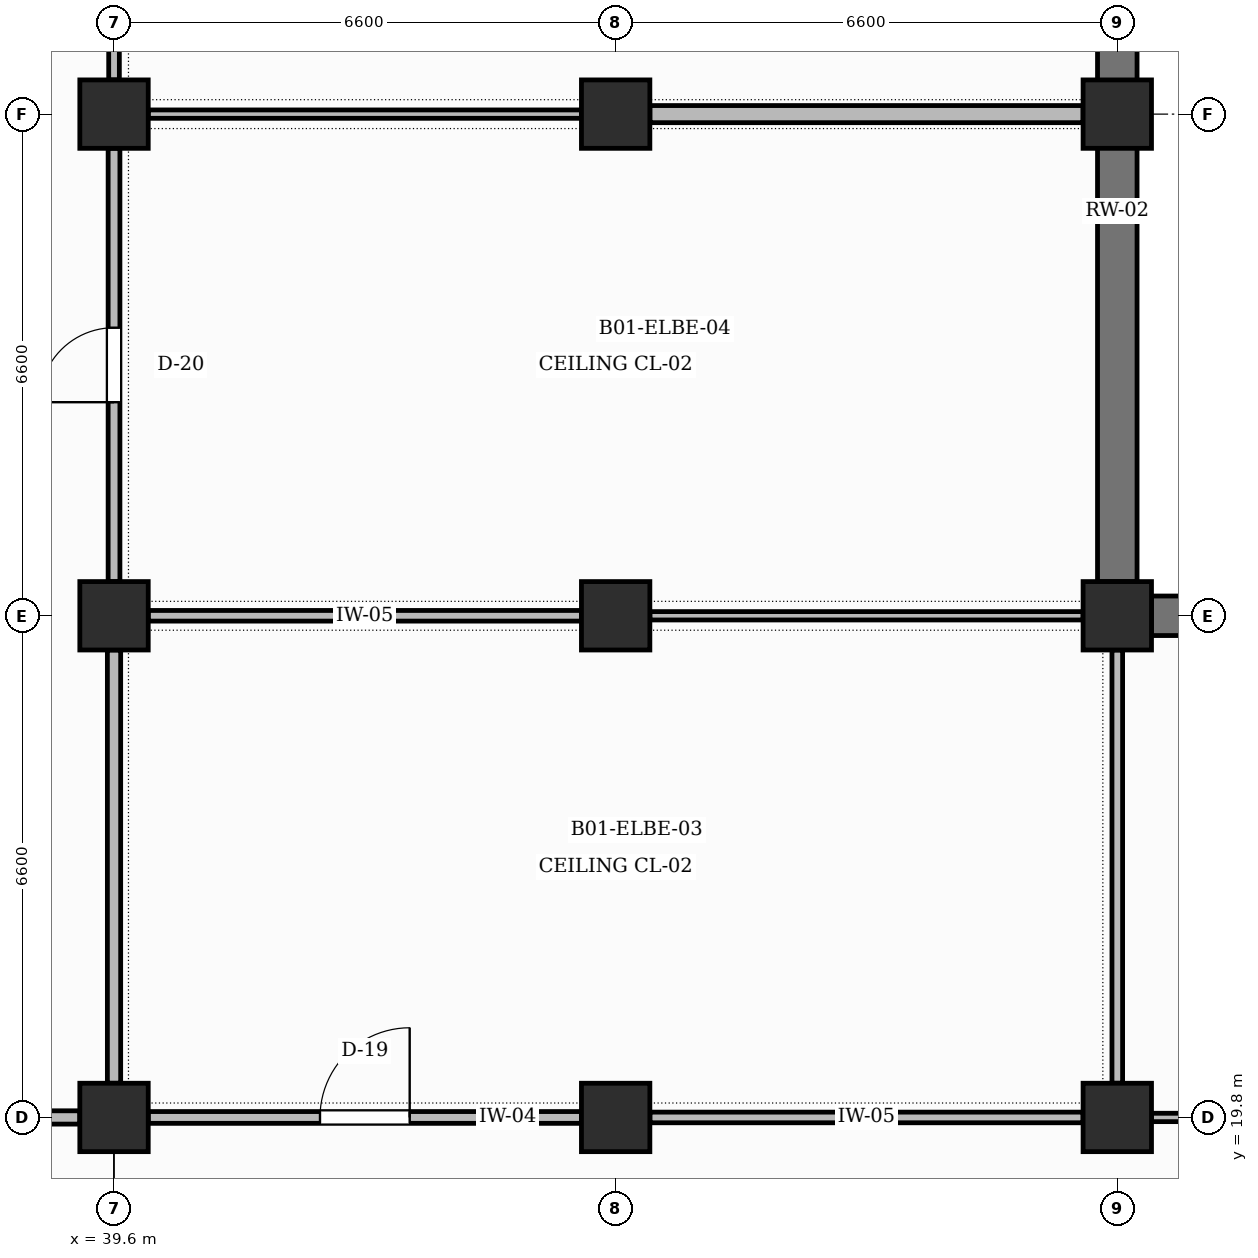
"""IFC4 building model, lengths in metres.
Left out: names, types, materials, properties, quantities, classifications, styles, units other than length and angle.
Written with IfcOpenShell. Run it as: python <this file> out.ifc"""

import sys

from ifc_helpers import new_model, si_unit, direction, frame, frame_2d, origin, origin_2d, place, context, subcontext, project, spatial, rectangle, extrude, element, fill, save


model = new_model("IFC4")
c1 = context("Model", 3, precision=1e-05, world=origin(), true_north=direction((0.0, 1.0)))
c2 = subcontext(c1, "Body", "Model", "MODEL_VIEW")
j1 = project(units=[si_unit("LENGTHUNIT", "METRE"), si_unit("PLANEANGLEUNIT", "RADIAN")], contexts=[c1])
p1 = place(None, origin())
s1 = spatial("IfcSite", under=j1, at=p1, CompositionType="ELEMENT")
p2 = place(p1, origin())
s2 = spatial("IfcBuilding", under=s1, at=p2, CompositionType="ELEMENT")
p3 = place(p2, frame((0.0, 0.0, -4.5)))
s3 = spatial("IfcBuildingStorey", under=s2, at=p3, CompositionType="ELEMENT", Elevation=-4.5)
for number, where, z_axis, x_axis in (
    (1, (39.6, 19.8, 0.0), (0.0, 0.0, 1.0), (1.0, 0.0, 0.0)),
    (2, (39.6, 26.4, 0.0), (0.0, 0.0, 1.0), (1.0, 0.0, 0.0)),
    (3, (39.6, 33.0, 0.0), (0.0, 0.0, 1.0), (1.0, 0.0, 0.0)),
    (4, (46.2, 19.8, 0.0), (0.0, 0.0, 1.0), (1.0, 0.0, 0.0)),
    (5, (46.2, 26.4, 0.0), (0.0, 0.0, 1.0), (1.0, 0.0, 0.0)),
    (6, (46.2, 33.0, 0.0), (0.0, 0.0, 1.0), (1.0, 0.0, 0.0)),
    (7, (52.8, 19.8, 0.0), (0.0, 0.0, 1.0), (1.0, 0.0, 0.0)),
    (8, (52.8, 26.4, 0.0), (0.0, 0.0, 1.0), (1.0, 0.0, 0.0)),
    (9, (52.8, 33.0, 0.0), (0.0, 0.0, 1.0), (1.0, 0.0, 0.0)),
):
    element("IfcColumn", number, at=place(p3, frame(where, z_axis=z_axis, x_axis=x_axis)), inside=s3, PredefinedType="COLUMN", context=c2, shape_type="SweptSolid", body=[
        extrude(rectangle(XDim=0.9, YDim=0.9, at=origin_2d()), origin(), (0.0, 0.0, 1.0), 4.5),
    ])
for number, where, z_axis, x_axis in (
    (10, (52.8, 26.85, 0.0), (0.0, 0.0, 1.0), (0.0, 1.0, 0.0)),
    (11, (52.8, 33.45, 0.0), (0.0, 0.0, 1.0), (0.0, 1.0, 0.0)),
    (12, (53.25, 26.4, 0.0), (0.0, 0.0, 1.0), (1.0, 0.0, 0.0)),
):
    element("IfcWall", number, at=place(p3, frame(where, z_axis=z_axis, x_axis=x_axis)), inside=s3, PredefinedType="USERDEFINED", context=c2, shape_type="SweptSolid", body=[
        extrude(rectangle(XDim=5.7, YDim=0.52, at=frame_2d((2.85, 0.0))), origin(), (0.0, 0.0, 1.0), 3.49),
    ])
p4 = place(p3, frame((33.475, 19.8, 0.0), z_axis=(0.0, 0.0, 1.0), x_axis=(1.0, 0.0, 0.0)))
e13 = element("IfcWall", 13, at=p4, inside=s3, PredefinedType="PARTITIONING", context=c2, shape_type="SweptSolid", body=[
    extrude(rectangle(XDim=5.675, YDim=0.175, at=frame_2d((2.837, 0.0))), origin(), (0.0, 0.0, 1.0), 3.24),
])
p5 = place(p4, frame((1.925, 0.0, 0.0)))
e14 = element("IfcOpeningElement", 14, at=p5, cuts=e13, PredefinedType="OPENING", context=c2, shape_type="SweptSolid", body=[
    extrude(rectangle(XDim=1.8, YDim=2.3, at=frame_2d((0.9, 1.15))), frame((0.0, 0.097, 0.0), z_axis=(0.0, -1.0, 0.0), x_axis=(1.0, 0.0, 0.0)), (0.0, 0.0, 1.0), 0.195),
])
p6 = place(p3, frame((39.6, 20.25, 0.0), z_axis=(0.0, 0.0, 1.0), x_axis=(0.0, 1.0, 0.0)))
e15 = element("IfcWall", 15, at=p6, inside=s3, PredefinedType="PARTITIONING", context=c2, shape_type="SweptSolid", body=[
    extrude(rectangle(XDim=5.7, YDim=0.175, at=frame_2d((2.85, 0.0))), origin(), (0.0, 0.0, 1.0), 3.34),
])
p7 = place(p3, frame((39.6, 26.85, 0.0), z_axis=(0.0, 0.0, 1.0), x_axis=(0.0, 1.0, 0.0)))
e16 = element("IfcWall", 16, at=p7, inside=s3, PredefinedType="PARTITIONING", context=c2, shape_type="SweptSolid", body=[
    extrude(rectangle(XDim=5.7, YDim=0.155, at=frame_2d((2.85, 0.0))), origin(), (0.0, 0.0, 1.0), 3.34),
])
p8 = place(p7, frame((2.36, 0.0, 0.0)))
e17 = element("IfcOpeningElement", 17, at=p8, cuts=e16, PredefinedType="OPENING", context=c2, shape_type="SweptSolid", body=[
    extrude(rectangle(XDim=0.98, YDim=2.15, at=frame_2d((0.49, 1.075))), frame((0.0, 0.087, 0.0), z_axis=(0.0, -1.0, 0.0), x_axis=(1.0, 0.0, 0.0)), (0.0, 0.0, 1.0), 0.175),
])
p9 = place(p3, frame((39.6, 33.45, 0.0), z_axis=(0.0, 0.0, 1.0), x_axis=(0.0, 1.0, 0.0)))
e18 = element("IfcWall", 18, at=p9, inside=s3, PredefinedType="PARTITIONING", context=c2, shape_type="SweptSolid", body=[
    extrude(rectangle(XDim=5.7, YDim=0.14, at=frame_2d((2.85, 0.0))), origin(), (0.0, 0.0, 1.0), 3.34),
])
p10 = place(p9, frame((2.325, 0.0, 0.0)))
e19 = element("IfcOpeningElement", 19, at=p10, cuts=e18, PredefinedType="OPENING", context=c2, shape_type="SweptSolid", body=[
    extrude(rectangle(XDim=1.05, YDim=2.15, at=frame_2d((0.525, 1.075))), frame((0.0, 0.08, 0.0), z_axis=(0.0, -1.0, 0.0), x_axis=(1.0, 0.0, 0.0)), (0.0, 0.0, 1.0), 0.16),
])
p11 = place(p3, frame((40.05, 19.8, 0.0), z_axis=(0.0, 0.0, 1.0), x_axis=(1.0, 0.0, 0.0)))
e20 = element("IfcWall", 20, at=p11, inside=s3, PredefinedType="PARTITIONING", context=c2, shape_type="SweptSolid", body=[
    extrude(rectangle(XDim=5.7, YDim=0.155, at=frame_2d((2.85, 0.0))), origin(), (0.0, 0.0, 1.0), 3.34),
])
p12 = place(p11, frame((2.26, 0.0, 0.0)))
e21 = element("IfcOpeningElement", 21, at=p12, cuts=e20, PredefinedType="OPENING", context=c2, shape_type="SweptSolid", body=[
    extrude(rectangle(XDim=1.18, YDim=2.2, at=frame_2d((0.59, 1.1))), frame((0.0, 0.087, 0.0), z_axis=(0.0, -1.0, 0.0), x_axis=(1.0, 0.0, 0.0)), (0.0, 0.0, 1.0), 0.175),
])
p13 = place(p3, frame((40.05, 26.4, 0.0), z_axis=(0.0, 0.0, 1.0), x_axis=(1.0, 0.0, 0.0)))
e22 = element("IfcWall", 22, at=p13, inside=s3, PredefinedType="PARTITIONING", context=c2, shape_type="SweptSolid", body=[
    extrude(rectangle(XDim=5.7, YDim=0.14, at=frame_2d((2.85, 0.0))), origin(), (0.0, 0.0, 1.0), 3.24),
])
p14 = place(p3, frame((40.05, 33.0, 0.0), z_axis=(0.0, 0.0, 1.0), x_axis=(1.0, 0.0, 0.0)))
e23 = element("IfcWall", 23, at=p14, inside=s3, PredefinedType="PARTITIONING", context=c2, shape_type="SweptSolid", body=[
    extrude(rectangle(XDim=5.7, YDim=0.11, at=frame_2d((2.85, 0.0))), origin(), (0.0, 0.0, 1.0), 3.34),
])
p15 = place(p3, frame((46.65, 19.8, 0.0), z_axis=(0.0, 0.0, 1.0), x_axis=(1.0, 0.0, 0.0)))
e24 = element("IfcWall", 24, at=p15, inside=s3, PredefinedType="PARTITIONING", context=c2, shape_type="SweptSolid", body=[
    extrude(rectangle(XDim=5.7, YDim=0.14, at=frame_2d((2.85, 0.0))), origin(), (0.0, 0.0, 1.0), 3.24),
])
p16 = place(p3, frame((52.8, 20.25, 0.0), z_axis=(0.0, 0.0, 1.0), x_axis=(0.0, 1.0, 0.0)))
e25 = element("IfcWall", 25, at=p16, inside=s3, PredefinedType="PARTITIONING", context=c2, shape_type="SweptSolid", body=[
    extrude(rectangle(XDim=5.7, YDim=0.14, at=frame_2d((2.85, 0.0))), origin(), (0.0, 0.0, 1.0), 3.34),
])
p17 = place(p3, frame((46.65, 26.4, 0.0), z_axis=(0.0, 0.0, 1.0), x_axis=(1.0, 0.0, 0.0)))
e26 = element("IfcWall", 26, at=p17, inside=s3, PredefinedType="PARTITIONING", context=c2, shape_type="SweptSolid", body=[
    extrude(rectangle(XDim=5.7, YDim=0.11, at=frame_2d((2.85, 0.0))), origin(), (0.0, 0.0, 1.0), 3.34),
])
p18 = place(p3, frame((46.65, 33.0, 0.0), z_axis=(0.0, 0.0, 1.0), x_axis=(1.0, 0.0, 0.0)))
e27 = element("IfcWall", 27, at=p18, inside=s3, PredefinedType="PARTITIONING", context=c2, shape_type="SweptSolid", body=[
    extrude(rectangle(XDim=5.7, YDim=0.225, at=frame_2d((2.85, 0.0))), origin(), (0.0, 0.0, 1.0), 3.24),
])
p19 = place(p3, frame((53.25, 19.8, 0.0), z_axis=(0.0, 0.0, 1.0), x_axis=(1.0, 0.0, 0.0)))
e28 = element("IfcWall", 28, at=p19, inside=s3, PredefinedType="PARTITIONING", context=c2, shape_type="SweptSolid", body=[
    extrude(rectangle(XDim=5.7, YDim=0.11, at=frame_2d((2.85, 0.0))), origin(), (0.0, 0.0, 1.0), 3.34),
])
p20 = place(p19, frame((2.14, 0.0, 0.0)))
e29 = element("IfcOpeningElement", 29, at=p20, cuts=e28, PredefinedType="OPENING", context=c2, shape_type="SweptSolid", body=[
    extrude(rectangle(XDim=1.42, YDim=2.2, at=frame_2d((0.71, 1.1))), frame((0.0, 0.065, 0.0), z_axis=(0.0, -1.0, 0.0), x_axis=(1.0, 0.0, 0.0)), (0.0, 0.0, 1.0), 0.13),
])
p21 = place(p12, origin())
e30 = element("IfcDoor", 30, at=p21, inside=s3, OperationType="SINGLE_SWING_RIGHT", PredefinedType="DOOR", context=c2, shape_type="SweptSolid", body=[
    extrude(rectangle(XDim=1.18, YDim=2.2, at=frame_2d((0.59, 1.1))), frame((0.0, 0.025, 0.0), z_axis=(0.0, -1.0, 0.0), x_axis=(1.0, 0.0, 0.0)), (0.0, 0.0, 1.0), 0.05),
])
fill(e21, e30)
p22 = place(p8, origin())
e31 = element("IfcDoor", 31, at=p22, inside=s3, OperationType="SINGLE_SWING_LEFT", PredefinedType="DOOR", context=c2, shape_type="SweptSolid", body=[
    extrude(rectangle(XDim=0.98, YDim=2.15, at=frame_2d((0.49, 1.075))), frame((0.0, 0.025, 0.0), z_axis=(0.0, -1.0, 0.0), x_axis=(1.0, 0.0, 0.0)), (0.0, 0.0, 1.0), 0.05),
])
fill(e17, e31)
save(model, sys.argv[1])
